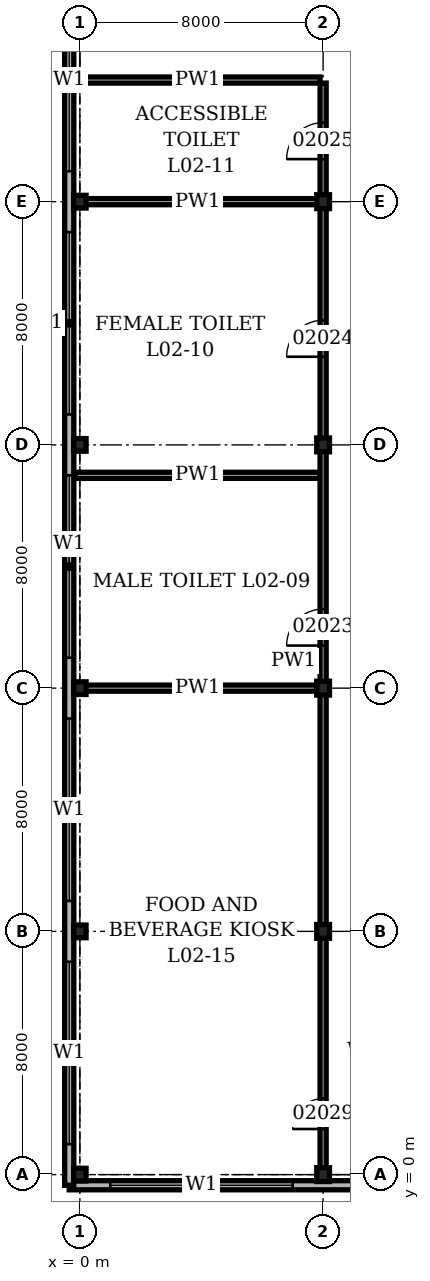
"""IFC4 building model, lengths in metres.
Left out: names, types, materials, properties, quantities, classifications, styles, units other than length and angle.
Written with IfcOpenShell. Run it as: python <this file> out.ifc"""

import sys

from ifc_helpers import new_model, si_unit, direction, frame, frame_2d, origin, origin_2d, place, context, subcontext, project, spatial, rectangle, i_section, extrude, element, fill, save


model = new_model("IFC4")
c1 = context("Model", 3, precision=1e-05, world=origin(), true_north=direction((0.0, 1.0)))
c2 = subcontext(c1, "Body", "Model", "MODEL_VIEW")
j1 = project(units=[si_unit("LENGTHUNIT", "METRE"), si_unit("PLANEANGLEUNIT", "RADIAN")], contexts=[c1])
p1 = place(None, origin())
s1 = spatial("IfcSite", under=j1, at=p1, CompositionType="ELEMENT")
p2 = place(p1, origin())
s2 = spatial("IfcBuilding", under=s1, at=p2, CompositionType="ELEMENT")
p3 = place(p2, frame((0.0, 0.0, 9.9)))
s3 = spatial("IfcBuildingStorey", under=s2, at=p3, CompositionType="ELEMENT", Elevation=9.9)
for number, where, z_axis, x_axis in (
    (1, (0.0, 0.0, 0.0), (0.0, 0.0, 1.0), (1.0, 0.0, 0.0)),
    (2, (0.0, 8.0, 0.0), (0.0, 0.0, 1.0), (1.0, 0.0, 0.0)),
    (3, (0.0, 16.0, 0.0), (0.0, 0.0, 1.0), (1.0, 0.0, 0.0)),
    (4, (0.0, 24.0, 0.0), (0.0, 0.0, 1.0), (1.0, 0.0, 0.0)),
    (5, (0.0, 32.0, 0.0), (0.0, 0.0, 1.0), (1.0, 0.0, 0.0)),
):
    element("IfcColumn", number, at=place(p3, frame(where, z_axis=z_axis, x_axis=x_axis)), inside=s3, PredefinedType="COLUMN", context=c2, shape_type="SweptSolid", body=[
        extrude(i_section(OverallWidth=0.406, OverallDepth=0.417, WebThickness=0.03, FlangeThickness=0.048, at=origin_2d()), origin(), (0.0, 0.0, 1.0), 5.0),
    ])
for number, where, z_axis, x_axis in (
    (6, (8.0, 0.0, 0.0), (0.0, 0.0, 1.0), (1.0, 0.0, 0.0)),
    (7, (8.0, 8.0, 0.0), (0.0, 0.0, 1.0), (1.0, 0.0, 0.0)),
    (8, (8.0, 16.0, 0.0), (0.0, 0.0, 1.0), (1.0, 0.0, 0.0)),
    (9, (8.0, 24.0, 0.0), (0.0, 0.0, 1.0), (1.0, 0.0, 0.0)),
    (10, (8.0, 32.0, 0.0), (0.0, 0.0, 1.0), (1.0, 0.0, 0.0)),
):
    element("IfcColumn", number, at=place(p3, frame(where, z_axis=z_axis, x_axis=x_axis)), inside=s3, PredefinedType="COLUMN", context=c2, shape_type="SweptSolid", body=[
        extrude(i_section(OverallWidth=0.419, OverallDepth=0.455, WebThickness=0.042, FlangeThickness=0.068, at=origin_2d()), origin(), (0.0, 0.0, 1.0), 5.0),
    ])
p4 = place(p3, frame((-0.35, -0.35, 0.0), z_axis=(0.0, 0.0, 1.0), x_axis=(1.0, 0.0, 0.0)))
e11 = element("IfcWall", 11, at=p4, inside=s3, PredefinedType="SOLIDWALL", context=c2, shape_type="SweptSolid", body=[
    extrude(rectangle(XDim=112.7, YDim=0.3, at=frame_2d((56.35, 0.0))), origin(), (0.0, 0.0, 1.0), 5.0),
])
p5 = place(p4, frame((1.35, 0.0, 1.0)))
e12 = element("IfcOpeningElement", 12, at=p5, cuts=e11, PredefinedType="OPENING", context=c2, shape_type="SweptSolid", body=[
    extrude(rectangle(XDim=6.0, YDim=1.5, at=frame_2d((3.0, 0.75))), frame((0.0, 0.16, 0.0), z_axis=(0.0, -1.0, 0.0), x_axis=(1.0, 0.0, 0.0)), (0.0, 0.0, 1.0), 0.32),
])
p6 = place(p4, frame((9.35, 0.0, 1.0)))
e13 = element("IfcOpeningElement", 13, at=p6, cuts=e11, PredefinedType="OPENING", context=c2, shape_type="SweptSolid", body=[
    extrude(rectangle(XDim=6.0, YDim=1.5, at=frame_2d((3.0, 0.75))), frame((0.0, 0.16, 0.0), z_axis=(0.0, -1.0, 0.0), x_axis=(1.0, 0.0, 0.0)), (0.0, 0.0, 1.0), 0.32),
])
p7 = place(p4, frame((17.35, 0.0, 1.0)))
e14 = element("IfcOpeningElement", 14, at=p7, cuts=e11, PredefinedType="OPENING", context=c2, shape_type="SweptSolid", body=[
    extrude(rectangle(XDim=6.0, YDim=1.5, at=frame_2d((3.0, 0.75))), frame((0.0, 0.16, 0.0), z_axis=(0.0, -1.0, 0.0), x_axis=(1.0, 0.0, 0.0)), (0.0, 0.0, 1.0), 0.32),
])
p8 = place(p4, frame((25.35, 0.0, 1.0)))
e15 = element("IfcOpeningElement", 15, at=p8, cuts=e11, PredefinedType="OPENING", context=c2, shape_type="SweptSolid", body=[
    extrude(rectangle(XDim=6.0, YDim=1.5, at=frame_2d((3.0, 0.75))), frame((0.0, 0.16, 0.0), z_axis=(0.0, -1.0, 0.0), x_axis=(1.0, 0.0, 0.0)), (0.0, 0.0, 1.0), 0.32),
])
p9 = place(p4, frame((33.35, 0.0, 1.0)))
e16 = element("IfcOpeningElement", 16, at=p9, cuts=e11, PredefinedType="OPENING", context=c2, shape_type="SweptSolid", body=[
    extrude(rectangle(XDim=6.0, YDim=1.5, at=frame_2d((3.0, 0.75))), frame((0.0, 0.16, 0.0), z_axis=(0.0, -1.0, 0.0), x_axis=(1.0, 0.0, 0.0)), (0.0, 0.0, 1.0), 0.32),
])
p10 = place(p4, frame((41.35, 0.0, 1.0)))
e17 = element("IfcOpeningElement", 17, at=p10, cuts=e11, PredefinedType="OPENING", context=c2, shape_type="SweptSolid", body=[
    extrude(rectangle(XDim=6.0, YDim=1.5, at=frame_2d((3.0, 0.75))), frame((0.0, 0.16, 0.0), z_axis=(0.0, -1.0, 0.0), x_axis=(1.0, 0.0, 0.0)), (0.0, 0.0, 1.0), 0.32),
])
p11 = place(p4, frame((49.35, 0.0, 1.0)))
e18 = element("IfcOpeningElement", 18, at=p11, cuts=e11, PredefinedType="OPENING", context=c2, shape_type="SweptSolid", body=[
    extrude(rectangle(XDim=6.0, YDim=1.5, at=frame_2d((3.0, 0.75))), frame((0.0, 0.16, 0.0), z_axis=(0.0, -1.0, 0.0), x_axis=(1.0, 0.0, 0.0)), (0.0, 0.0, 1.0), 0.32),
])
p12 = place(p4, frame((57.35, 0.0, 1.0)))
e19 = element("IfcOpeningElement", 19, at=p12, cuts=e11, PredefinedType="OPENING", context=c2, shape_type="SweptSolid", body=[
    extrude(rectangle(XDim=6.0, YDim=1.5, at=frame_2d((3.0, 0.75))), frame((0.0, 0.16, 0.0), z_axis=(0.0, -1.0, 0.0), x_axis=(1.0, 0.0, 0.0)), (0.0, 0.0, 1.0), 0.32),
])
p13 = place(p4, frame((65.35, 0.0, 1.0)))
e20 = element("IfcOpeningElement", 20, at=p13, cuts=e11, PredefinedType="OPENING", context=c2, shape_type="SweptSolid", body=[
    extrude(rectangle(XDim=6.0, YDim=1.5, at=frame_2d((3.0, 0.75))), frame((0.0, 0.16, 0.0), z_axis=(0.0, -1.0, 0.0), x_axis=(1.0, 0.0, 0.0)), (0.0, 0.0, 1.0), 0.32),
])
p14 = place(p4, frame((73.35, 0.0, 1.0)))
e21 = element("IfcOpeningElement", 21, at=p14, cuts=e11, PredefinedType="OPENING", context=c2, shape_type="SweptSolid", body=[
    extrude(rectangle(XDim=6.0, YDim=1.5, at=frame_2d((3.0, 0.75))), frame((0.0, 0.16, 0.0), z_axis=(0.0, -1.0, 0.0), x_axis=(1.0, 0.0, 0.0)), (0.0, 0.0, 1.0), 0.32),
])
p15 = place(p4, frame((81.35, 0.0, 1.0)))
e22 = element("IfcOpeningElement", 22, at=p15, cuts=e11, PredefinedType="OPENING", context=c2, shape_type="SweptSolid", body=[
    extrude(rectangle(XDim=6.0, YDim=1.5, at=frame_2d((3.0, 0.75))), frame((0.0, 0.16, 0.0), z_axis=(0.0, -1.0, 0.0), x_axis=(1.0, 0.0, 0.0)), (0.0, 0.0, 1.0), 0.32),
])
p16 = place(p4, frame((89.35, 0.0, 1.0)))
e23 = element("IfcOpeningElement", 23, at=p16, cuts=e11, PredefinedType="OPENING", context=c2, shape_type="SweptSolid", body=[
    extrude(rectangle(XDim=6.0, YDim=1.5, at=frame_2d((3.0, 0.75))), frame((0.0, 0.16, 0.0), z_axis=(0.0, -1.0, 0.0), x_axis=(1.0, 0.0, 0.0)), (0.0, 0.0, 1.0), 0.32),
])
p17 = place(p4, frame((97.35, 0.0, 1.0)))
e24 = element("IfcOpeningElement", 24, at=p17, cuts=e11, PredefinedType="OPENING", context=c2, shape_type="SweptSolid", body=[
    extrude(rectangle(XDim=6.0, YDim=1.5, at=frame_2d((3.0, 0.75))), frame((0.0, 0.16, 0.0), z_axis=(0.0, -1.0, 0.0), x_axis=(1.0, 0.0, 0.0)), (0.0, 0.0, 1.0), 0.32),
])
p18 = place(p4, frame((105.35, 0.0, 1.0)))
e25 = element("IfcOpeningElement", 25, at=p18, cuts=e11, PredefinedType="OPENING", context=c2, shape_type="SweptSolid", body=[
    extrude(rectangle(XDim=6.0, YDim=1.5, at=frame_2d((3.0, 0.75))), frame((0.0, 0.16, 0.0), z_axis=(0.0, -1.0, 0.0), x_axis=(1.0, 0.0, 0.0)), (0.0, 0.0, 1.0), 0.32),
])
p19 = place(p3, frame((-0.35, 112.35, 0.0), z_axis=(0.0, 0.0, 1.0), x_axis=(0.0, -1.0, 0.0)))
e26 = element("IfcWall", 26, at=p19, inside=s3, PredefinedType="SOLIDWALL", context=c2, shape_type="SweptSolid", body=[
    extrude(rectangle(XDim=112.7, YDim=0.3, at=frame_2d((56.35, 0.0))), origin(), (0.0, 0.0, 1.0), 5.0),
])
p20 = place(p19, frame((1.35, 0.0, 1.0)))
e27 = element("IfcOpeningElement", 27, at=p20, cuts=e26, PredefinedType="OPENING", context=c2, shape_type="SweptSolid", body=[
    extrude(rectangle(XDim=6.0, YDim=1.5, at=frame_2d((3.0, 0.75))), frame((0.0, 0.16, 0.0), z_axis=(0.0, -1.0, 0.0), x_axis=(1.0, 0.0, 0.0)), (0.0, 0.0, 1.0), 0.32),
])
p21 = place(p19, frame((9.35, 0.0, 1.0)))
e28 = element("IfcOpeningElement", 28, at=p21, cuts=e26, PredefinedType="OPENING", context=c2, shape_type="SweptSolid", body=[
    extrude(rectangle(XDim=6.0, YDim=1.5, at=frame_2d((3.0, 0.75))), frame((0.0, 0.16, 0.0), z_axis=(0.0, -1.0, 0.0), x_axis=(1.0, 0.0, 0.0)), (0.0, 0.0, 1.0), 0.32),
])
p22 = place(p19, frame((17.35, 0.0, 1.0)))
e29 = element("IfcOpeningElement", 29, at=p22, cuts=e26, PredefinedType="OPENING", context=c2, shape_type="SweptSolid", body=[
    extrude(rectangle(XDim=6.0, YDim=1.5, at=frame_2d((3.0, 0.75))), frame((0.0, 0.16, 0.0), z_axis=(0.0, -1.0, 0.0), x_axis=(1.0, 0.0, 0.0)), (0.0, 0.0, 1.0), 0.32),
])
p23 = place(p19, frame((25.35, 0.0, 1.0)))
e30 = element("IfcOpeningElement", 30, at=p23, cuts=e26, PredefinedType="OPENING", context=c2, shape_type="SweptSolid", body=[
    extrude(rectangle(XDim=6.0, YDim=1.5, at=frame_2d((3.0, 0.75))), frame((0.0, 0.16, 0.0), z_axis=(0.0, -1.0, 0.0), x_axis=(1.0, 0.0, 0.0)), (0.0, 0.0, 1.0), 0.32),
])
p24 = place(p19, frame((33.35, 0.0, 1.0)))
e31 = element("IfcOpeningElement", 31, at=p24, cuts=e26, PredefinedType="OPENING", context=c2, shape_type="SweptSolid", body=[
    extrude(rectangle(XDim=6.0, YDim=1.5, at=frame_2d((3.0, 0.75))), frame((0.0, 0.16, 0.0), z_axis=(0.0, -1.0, 0.0), x_axis=(1.0, 0.0, 0.0)), (0.0, 0.0, 1.0), 0.32),
])
p25 = place(p19, frame((41.35, 0.0, 1.0)))
e32 = element("IfcOpeningElement", 32, at=p25, cuts=e26, PredefinedType="OPENING", context=c2, shape_type="SweptSolid", body=[
    extrude(rectangle(XDim=6.0, YDim=1.5, at=frame_2d((3.0, 0.75))), frame((0.0, 0.16, 0.0), z_axis=(0.0, -1.0, 0.0), x_axis=(1.0, 0.0, 0.0)), (0.0, 0.0, 1.0), 0.32),
])
p26 = place(p19, frame((49.35, 0.0, 1.0)))
e33 = element("IfcOpeningElement", 33, at=p26, cuts=e26, PredefinedType="OPENING", context=c2, shape_type="SweptSolid", body=[
    extrude(rectangle(XDim=6.0, YDim=1.5, at=frame_2d((3.0, 0.75))), frame((0.0, 0.16, 0.0), z_axis=(0.0, -1.0, 0.0), x_axis=(1.0, 0.0, 0.0)), (0.0, 0.0, 1.0), 0.32),
])
p27 = place(p19, frame((57.35, 0.0, 1.0)))
e34 = element("IfcOpeningElement", 34, at=p27, cuts=e26, PredefinedType="OPENING", context=c2, shape_type="SweptSolid", body=[
    extrude(rectangle(XDim=6.0, YDim=1.5, at=frame_2d((3.0, 0.75))), frame((0.0, 0.16, 0.0), z_axis=(0.0, -1.0, 0.0), x_axis=(1.0, 0.0, 0.0)), (0.0, 0.0, 1.0), 0.32),
])
p28 = place(p19, frame((65.35, 0.0, 1.0)))
e35 = element("IfcOpeningElement", 35, at=p28, cuts=e26, PredefinedType="OPENING", context=c2, shape_type="SweptSolid", body=[
    extrude(rectangle(XDim=6.0, YDim=1.5, at=frame_2d((3.0, 0.75))), frame((0.0, 0.16, 0.0), z_axis=(0.0, -1.0, 0.0), x_axis=(1.0, 0.0, 0.0)), (0.0, 0.0, 1.0), 0.32),
])
p29 = place(p19, frame((73.35, 0.0, 1.0)))
e36 = element("IfcOpeningElement", 36, at=p29, cuts=e26, PredefinedType="OPENING", context=c2, shape_type="SweptSolid", body=[
    extrude(rectangle(XDim=6.0, YDim=1.5, at=frame_2d((3.0, 0.75))), frame((0.0, 0.16, 0.0), z_axis=(0.0, -1.0, 0.0), x_axis=(1.0, 0.0, 0.0)), (0.0, 0.0, 1.0), 0.32),
])
p30 = place(p19, frame((81.35, 0.0, 1.0)))
e37 = element("IfcOpeningElement", 37, at=p30, cuts=e26, PredefinedType="OPENING", context=c2, shape_type="SweptSolid", body=[
    extrude(rectangle(XDim=6.0, YDim=1.5, at=frame_2d((3.0, 0.75))), frame((0.0, 0.16, 0.0), z_axis=(0.0, -1.0, 0.0), x_axis=(1.0, 0.0, 0.0)), (0.0, 0.0, 1.0), 0.32),
])
p31 = place(p19, frame((89.35, 0.0, 1.0)))
e38 = element("IfcOpeningElement", 38, at=p31, cuts=e26, PredefinedType="OPENING", context=c2, shape_type="SweptSolid", body=[
    extrude(rectangle(XDim=6.0, YDim=1.5, at=frame_2d((3.0, 0.75))), frame((0.0, 0.16, 0.0), z_axis=(0.0, -1.0, 0.0), x_axis=(1.0, 0.0, 0.0)), (0.0, 0.0, 1.0), 0.32),
])
p32 = place(p19, frame((97.35, 0.0, 1.0)))
e39 = element("IfcOpeningElement", 39, at=p32, cuts=e26, PredefinedType="OPENING", context=c2, shape_type="SweptSolid", body=[
    extrude(rectangle(XDim=6.0, YDim=1.5, at=frame_2d((3.0, 0.75))), frame((0.0, 0.16, 0.0), z_axis=(0.0, -1.0, 0.0), x_axis=(1.0, 0.0, 0.0)), (0.0, 0.0, 1.0), 0.32),
])
p33 = place(p19, frame((105.35, 0.0, 1.0)))
e40 = element("IfcOpeningElement", 40, at=p33, cuts=e26, PredefinedType="OPENING", context=c2, shape_type="SweptSolid", body=[
    extrude(rectangle(XDim=6.0, YDim=1.5, at=frame_2d((3.0, 0.75))), frame((0.0, 0.16, 0.0), z_axis=(0.0, -1.0, 0.0), x_axis=(1.0, 0.0, 0.0)), (0.0, 0.0, 1.0), 0.32),
])
p34 = place(p3, frame((-0.15, 16.0, 0.0), z_axis=(0.0, 0.0, 1.0), x_axis=(1.0, 0.0, 0.0)))
e41 = element("IfcWall", 41, at=p34, inside=s3, PredefinedType="PARTITIONING", context=c2, shape_type="SweptSolid", body=[
    extrude(rectangle(XDim=8.05, YDim=0.2, at=frame_2d((4.025, 0.0))), origin(), (0.0, 0.0, 1.0), 4.028),
])
p35 = place(p3, frame((-0.15, 23.0, 0.0), z_axis=(0.0, 0.0, 1.0), x_axis=(1.0, 0.0, 0.0)))
e42 = element("IfcWall", 42, at=p35, inside=s3, PredefinedType="PARTITIONING", context=c2, shape_type="SweptSolid", body=[
    extrude(rectangle(XDim=8.05, YDim=0.2, at=frame_2d((4.025, 0.0))), origin(), (0.0, 0.0, 1.0), 4.8),
])
p36 = place(p3, frame((-0.15, 32.0, 0.0), z_axis=(0.0, 0.0, 1.0), x_axis=(1.0, 0.0, 0.0)))
e43 = element("IfcWall", 43, at=p36, inside=s3, PredefinedType="PARTITIONING", context=c2, shape_type="SweptSolid", body=[
    extrude(rectangle(XDim=8.05, YDim=0.2, at=frame_2d((4.025, 0.0))), origin(), (0.0, 0.0, 1.0), 4.028),
])
p37 = place(p3, frame((-0.15, 36.0, 0.0), z_axis=(0.0, 0.0, 1.0), x_axis=(1.0, 0.0, 0.0)))
e44 = element("IfcWall", 44, at=p37, inside=s3, PredefinedType="PARTITIONING", context=c2, shape_type="SweptSolid", body=[
    extrude(rectangle(XDim=8.05, YDim=0.2, at=frame_2d((4.025, 0.0))), origin(), (0.0, 0.0, 1.0), 4.8),
])
p38 = place(p3, frame((8.0, -0.15, 0.0), z_axis=(0.0, 0.0, 1.0), x_axis=(0.0, 1.0, 0.0)))
e45 = element("IfcWall", 45, at=p38, inside=s3, PredefinedType="PARTITIONING", context=c2, shape_type="SweptSolid", body=[
    extrude(rectangle(XDim=36.05, YDim=0.2, at=frame_2d((18.025, 0.0))), origin(), (0.0, 0.0, 1.0), 4.028),
])
p39 = place(p38, frame((17.55, 0.0, 0.0)))
e46 = element("IfcOpeningElement", 46, at=p39, cuts=e45, PredefinedType="OPENING", context=c2, shape_type="SweptSolid", body=[
    extrude(rectangle(XDim=1.2, YDim=2.1, at=frame_2d((0.6, 1.05))), frame((0.0, 0.11, 0.0), z_axis=(0.0, -1.0, 0.0), x_axis=(1.0, 0.0, 0.0)), (0.0, 0.0, 1.0), 0.22),
])
p40 = place(p38, frame((27.05, 0.0, 0.0)))
e47 = element("IfcOpeningElement", 47, at=p40, cuts=e45, PredefinedType="OPENING", context=c2, shape_type="SweptSolid", body=[
    extrude(rectangle(XDim=1.2, YDim=2.1, at=frame_2d((0.6, 1.05))), frame((0.0, 0.11, 0.0), z_axis=(0.0, -1.0, 0.0), x_axis=(1.0, 0.0, 0.0)), (0.0, 0.0, 1.0), 0.22),
])
p41 = place(p38, frame((33.55, 0.0, 0.0)))
e48 = element("IfcOpeningElement", 48, at=p41, cuts=e45, PredefinedType="OPENING", context=c2, shape_type="SweptSolid", body=[
    extrude(rectangle(XDim=1.2, YDim=2.1, at=frame_2d((0.6, 1.05))), frame((0.0, 0.11, 0.0), z_axis=(0.0, -1.0, 0.0), x_axis=(1.0, 0.0, 0.0)), (0.0, 0.0, 1.0), 0.22),
])
p42 = place(p38, frame((1.65, 0.0, 0.0)))
e49 = element("IfcOpeningElement", 49, at=p42, cuts=e45, PredefinedType="OPENING", context=c2, shape_type="SweptSolid", body=[
    extrude(rectangle(XDim=1.0, YDim=2.1, at=frame_2d((0.5, 1.05))), frame((0.0, 0.11, 0.0), z_axis=(0.0, -1.0, 0.0), x_axis=(1.0, 0.0, 0.0)), (0.0, 0.0, 1.0), 0.22),
])
p43 = place(p5, origin())
e50 = element("IfcWindow", 50, at=p43, inside=s3, PartitioningType="SINGLE_PANEL", PredefinedType="WINDOW", context=c2, shape_type="SweptSolid", body=[
    extrude(rectangle(XDim=6.0, YDim=1.5, at=frame_2d((3.0, 0.75))), frame((0.0, 0.03, 0.0), z_axis=(0.0, -1.0, 0.0), x_axis=(1.0, 0.0, 0.0)), (0.0, 0.0, 1.0), 0.06),
])
fill(e12, e50)
p44 = place(p29, origin())
e51 = element("IfcWindow", 51, at=p44, inside=s3, PartitioningType="SINGLE_PANEL", PredefinedType="WINDOW", context=c2, shape_type="SweptSolid", body=[
    extrude(rectangle(XDim=6.0, YDim=1.5, at=frame_2d((3.0, 0.75))), frame((0.0, 0.03, 0.0), z_axis=(0.0, -1.0, 0.0), x_axis=(1.0, 0.0, 0.0)), (0.0, 0.0, 1.0), 0.06),
])
fill(e36, e51)
p45 = place(p30, origin())
e52 = element("IfcWindow", 52, at=p45, inside=s3, PartitioningType="SINGLE_PANEL", PredefinedType="WINDOW", context=c2, shape_type="SweptSolid", body=[
    extrude(rectangle(XDim=6.0, YDim=1.5, at=frame_2d((3.0, 0.75))), frame((0.0, 0.03, 0.0), z_axis=(0.0, -1.0, 0.0), x_axis=(1.0, 0.0, 0.0)), (0.0, 0.0, 1.0), 0.06),
])
fill(e37, e52)
p46 = place(p31, origin())
e53 = element("IfcWindow", 53, at=p46, inside=s3, PartitioningType="SINGLE_PANEL", PredefinedType="WINDOW", context=c2, shape_type="SweptSolid", body=[
    extrude(rectangle(XDim=6.0, YDim=1.5, at=frame_2d((3.0, 0.75))), frame((0.0, 0.03, 0.0), z_axis=(0.0, -1.0, 0.0), x_axis=(1.0, 0.0, 0.0)), (0.0, 0.0, 1.0), 0.06),
])
fill(e38, e53)
p47 = place(p32, origin())
e54 = element("IfcWindow", 54, at=p47, inside=s3, PartitioningType="SINGLE_PANEL", PredefinedType="WINDOW", context=c2, shape_type="SweptSolid", body=[
    extrude(rectangle(XDim=6.0, YDim=1.5, at=frame_2d((3.0, 0.75))), frame((0.0, 0.03, 0.0), z_axis=(0.0, -1.0, 0.0), x_axis=(1.0, 0.0, 0.0)), (0.0, 0.0, 1.0), 0.06),
])
fill(e39, e54)
p48 = place(p33, origin())
e55 = element("IfcWindow", 55, at=p48, inside=s3, PartitioningType="SINGLE_PANEL", PredefinedType="WINDOW", context=c2, shape_type="SweptSolid", body=[
    extrude(rectangle(XDim=6.0, YDim=1.5, at=frame_2d((3.0, 0.75))), frame((0.0, 0.03, 0.0), z_axis=(0.0, -1.0, 0.0), x_axis=(1.0, 0.0, 0.0)), (0.0, 0.0, 1.0), 0.06),
])
fill(e40, e55)
p49 = place(p39, origin())
e56 = element("IfcDoor", 56, at=p49, inside=s3, OperationType="SINGLE_SWING_RIGHT", PredefinedType="DOOR", context=c2, shape_type="SweptSolid", body=[
    extrude(rectangle(XDim=1.2, YDim=2.1, at=frame_2d((0.6, 1.05))), frame((0.0, 0.1, 0.0), z_axis=(0.0, -1.0, 0.0), x_axis=(1.0, 0.0, 0.0)), (0.0, 0.0, 1.0), 0.199),
])
fill(e46, e56)
p50 = place(p40, origin())
e57 = element("IfcDoor", 57, at=p50, inside=s3, OperationType="SINGLE_SWING_RIGHT", PredefinedType="DOOR", context=c2, shape_type="SweptSolid", body=[
    extrude(rectangle(XDim=1.2, YDim=2.1, at=frame_2d((0.6, 1.05))), frame((0.0, 0.1, 0.0), z_axis=(0.0, -1.0, 0.0), x_axis=(1.0, 0.0, 0.0)), (0.0, 0.0, 1.0), 0.199),
])
fill(e47, e57)
p51 = place(p41, origin())
e58 = element("IfcDoor", 58, at=p51, inside=s3, OperationType="SINGLE_SWING_RIGHT", PredefinedType="DOOR", context=c2, shape_type="SweptSolid", body=[
    extrude(rectangle(XDim=1.2, YDim=2.1, at=frame_2d((0.6, 1.05))), frame((0.0, 0.1, 0.0), z_axis=(0.0, -1.0, 0.0), x_axis=(1.0, 0.0, 0.0)), (0.0, 0.0, 1.0), 0.199),
])
fill(e48, e58)
p52 = place(p42, origin())
e59 = element("IfcDoor", 59, at=p52, inside=s3, OperationType="SINGLE_SWING_LEFT", PredefinedType="DOOR", context=c2, shape_type="SweptSolid", body=[
    extrude(rectangle(XDim=1.0, YDim=2.1, at=frame_2d((0.5, 1.05))), frame((0.0, 0.1, 0.0), z_axis=(0.0, -1.0, 0.0), x_axis=(1.0, 0.0, 0.0)), (0.0, 0.0, 1.0), 0.199),
])
fill(e49, e59)
save(model, sys.argv[1])
